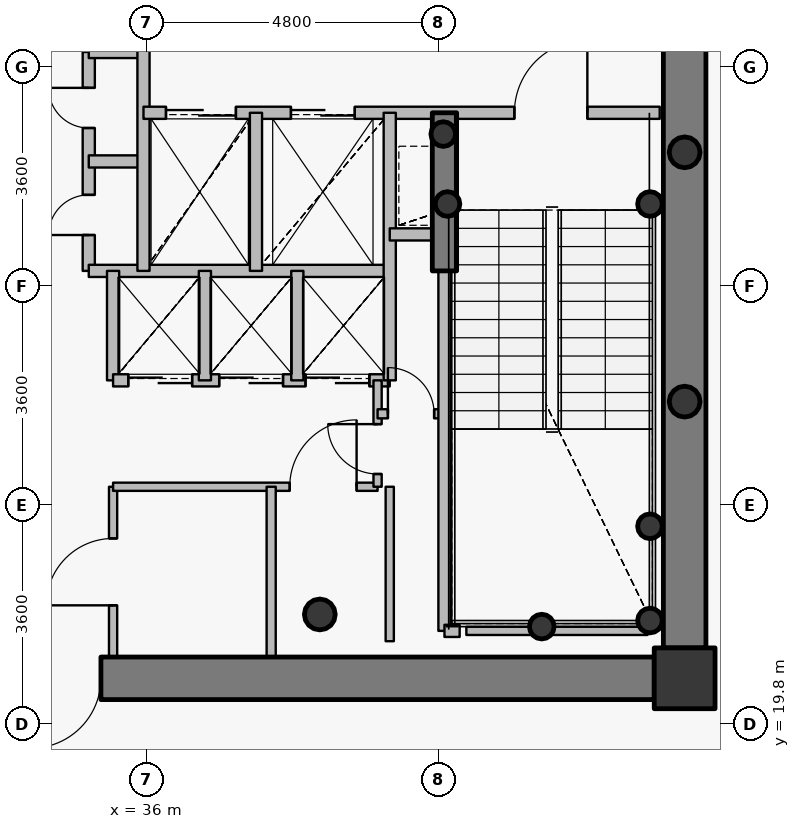
"""IFC4 building model, lengths in metres.
Left out: names, types, materials, properties, quantities, classifications, styles, units other than length and angle.
Written with IfcOpenShell. Run it as: python <this file> out.ifc"""

import sys

from ifc_helpers import new_model, si_unit, direction, frame, frame_2d, origin, origin_2d, place, context, subcontext, project, spatial, rectangle, hollow_circle, extrude, source, transform, mapped, element, fill, save


model = new_model("IFC4")
c1 = context("Model", 3, precision=1e-05, world=origin(), true_north=direction((0.0, 1.0)))
c2 = subcontext(c1, "Body", "Model", "MODEL_VIEW")
j1 = project(units=[si_unit("LENGTHUNIT", "METRE"), si_unit("PLANEANGLEUNIT", "RADIAN")], contexts=[c1])
p1 = place(None, origin())
s1 = spatial("IfcSite", under=j1, at=p1, CompositionType="ELEMENT")
p2 = place(p1, origin())
s2 = spatial("IfcBuilding", under=s1, at=p2, CompositionType="ELEMENT")
p3 = place(p2, frame((0.0, 0.0, 273.0)))
s3 = spatial("IfcBuildingStorey", under=s2, at=p3, CompositionType="ELEMENT", Elevation=273.0)
p4 = place(p3, frame((44.85, 20.55, 0.0), z_axis=(0.0, 0.0, 1.0), x_axis=(1.0, 0.0, 0.0)))
e1 = element("IfcColumn", 1, at=p4, inside=s3, PredefinedType="COLUMN", context=c2, shape_type="SweptSolid", body=[
    extrude(rectangle(XDim=1.0, YDim=1.0, at=origin_2d()), origin(), (0.0, 0.0, 1.0), 3.75),
])
p5 = place(p3, frame((38.85, 21.6, 0.0), z_axis=(0.0, 0.0, 1.0), x_axis=(1.0, 0.0, 0.0)))
e2 = element("IfcColumn", 2, at=p5, inside=s3, PredefinedType="COLUMN", context=c2, shape_type="SweptSolid", body=[
    extrude(hollow_circle(Radius=0.254, WallThickness=0.02, at=origin_2d()), origin(), (0.0, 0.0, 1.0), 3.75),
])
for number, where, z_axis, x_axis in (
    (3, (44.28, 21.5, 0.0), (0.0, 0.0, 1.0), (1.0, 0.0, 0.0)),
    (4, (44.28, 23.05, 0.0), (0.0, 0.0, 1.0), (1.0, 0.0, 0.0)),
    (5, (42.5, 21.4, 0.0), (0.0, 0.0, 1.0), (1.0, 0.0, 0.0)),
    (6, (40.95, 28.35, 0.0), (0.0, 0.0, 1.0), (1.0, 0.0, 0.0)),
    (7, (44.28, 28.35, 0.0), (0.0, 0.0, 1.0), (1.0, 0.0, 0.0)),
    (8, (40.88, 29.5, 0.0), (0.0, 0.0, 1.0), (1.0, 0.0, 0.0)),
):
    element("IfcColumn", number, at=place(p3, frame(where, z_axis=z_axis, x_axis=x_axis)), inside=s3, PredefinedType="COLUMN", context=c2, shape_type="SweptSolid", body=[
        extrude(hollow_circle(Radius=0.203, WallThickness=0.016, at=origin_2d()), origin(), (0.0, 0.0, 1.0), 3.75),
    ])
p6 = place(p3, frame((44.85, 32.95, 0.0), z_axis=(0.0, 0.0, 1.0), x_axis=(0.0, -1.0, 0.0)))
e9 = element("IfcWall", 9, at=p6, inside=s3, PredefinedType="SHEAR", context=c2, shape_type="SweptSolid", body=[
    extrude(rectangle(XDim=11.9, YDim=0.7, at=frame_2d((5.95, 0.0))), origin(), (0.0, 0.0, 1.0), 3.05),
])
p7 = place(p3, frame((44.35, 20.55, 0.0), z_axis=(0.0, 0.0, 1.0), x_axis=(-1.0, 0.0, 0.0)))
e10 = element("IfcWall", 10, at=p7, inside=s3, PredefinedType="SHEAR", context=c2, shape_type="SweptSolid", body=[
    extrude(rectangle(XDim=16.7, YDim=0.7, at=frame_2d((8.35, 0.0))), origin(), (0.0, 0.0, 1.0), 3.05),
])
p8 = place(p7, frame((12.925, 0.0, 0.0)))
e11 = element("IfcOpeningElement", 11, at=p8, cuts=e10, PredefinedType="OPENING", context=c2, shape_type="SweptSolid", body=[
    extrude(rectangle(XDim=1.15, YDim=2.15, at=origin_2d()), frame((0.575, 0.36, 1.075), z_axis=(0.0, -1.0, 0.0), x_axis=(1.0, 0.0, 0.0)), (0.0, 0.0, 1.0), 0.72),
])
p9 = place(p7, frame((9.1, 0.0, 0.0)))
e12 = element("IfcOpeningElement", 12, at=p9, cuts=e10, PredefinedType="OPENING", context=c2, shape_type="SweptSolid", body=[
    extrude(rectangle(XDim=1.15, YDim=2.15, at=origin_2d()), frame((0.575, 0.36, 1.075), z_axis=(0.0, -1.0, 0.0), x_axis=(1.0, 0.0, 0.0)), (0.0, 0.0, 1.0), 0.72),
])
p10 = place(p3, frame((40.9, 27.25, 0.0), z_axis=(0.0, 0.0, 1.0), x_axis=(0.0, 1.0, 0.0)))
e13 = element("IfcWall", 13, at=p10, inside=s3, PredefinedType="SHEAR", context=c2, shape_type="SweptSolid", body=[
    extrude(rectangle(XDim=2.6, YDim=0.4, at=frame_2d((1.3, 0.0))), origin(), (0.0, 0.0, 1.0), 3.1),
])
for number, where, z_axis, x_axis in (
    (14, (44.85, 25.1, 0.0), (0.0, 0.0, 1.0), (1.0, 0.0, 0.0)),
    (15, (44.85, 29.2, 0.0), (0.0, 0.0, 1.0), (1.0, 0.0, 0.0)),
):
    element("IfcColumn", number, at=place(p3, frame(where, z_axis=z_axis, x_axis=x_axis)), inside=s3, PredefinedType="COLUMN", context=c2, shape_type="SweptSolid", body=[
        extrude(hollow_circle(Radius=0.254, WallThickness=0.02, at=origin_2d()), origin(), (0.0, 0.0, 1.0), 3.75),
    ])
p11 = place(p3, frame((35.05, 27.25, 0.0), z_axis=(0.0, 0.0, 1.0), x_axis=(0.0, 1.0, 0.0)))
e16 = element("IfcWall", 16, at=p11, inside=s3, PredefinedType="PARTITIONING", context=c2, shape_type="SweptSolid", body=[
    extrude(rectangle(XDim=3.6, YDim=0.2, at=frame_2d((1.8, 0.0))), origin(), (0.0, 0.0, 1.0), 3.5),
])
p12 = place(p11, frame((0.59, 0.0, 0.0)))
e17 = element("IfcOpeningElement", 17, at=p12, cuts=e16, PredefinedType="OPENING", context=c2, shape_type="SweptSolid", body=[
    extrude(rectangle(XDim=0.66, YDim=2.05, at=origin_2d()), frame((0.33, 0.11, 1.025), z_axis=(0.0, -1.0, 0.0), x_axis=(1.0, 0.0, 0.0)), (0.0, 0.0, 1.0), 0.22),
])
p13 = place(p11, frame((2.35, 0.0, 0.0)))
e18 = element("IfcOpeningElement", 18, at=p13, cuts=e16, PredefinedType="OPENING", context=c2, shape_type="SweptSolid", body=[
    extrude(rectangle(XDim=0.66, YDim=2.05, at=origin_2d()), frame((0.33, 0.11, 1.025), z_axis=(0.0, -1.0, 0.0), x_axis=(1.0, 0.0, 0.0)), (0.0, 0.0, 1.0), 0.22),
])
p14 = place(p3, frame((35.05, 27.25, 0.0), z_axis=(0.0, 0.0, 1.0), x_axis=(1.0, 0.0, 0.0)))
e19 = element("IfcWall", 19, at=p14, inside=s3, PredefinedType="PARTITIONING", context=c2, shape_type="SweptSolid", body=[
    extrude(rectangle(XDim=4.95, YDim=0.2, at=frame_2d((2.475, 0.0))), origin(), (0.0, 0.0, 1.0), 3.085),
])
for number, where, z_axis, x_axis in (
    (20, (35.05, 29.05, 0.0), (0.0, 0.0, 1.0), (1.0, 0.0, 0.0)),
    (21, (35.05, 30.85, 0.0), (0.0, 0.0, 1.0), (1.0, 0.0, 0.0)),
):
    element("IfcWall", number, at=place(p3, frame(where, z_axis=z_axis, x_axis=x_axis)), inside=s3, PredefinedType="PARTITIONING", context=c2, shape_type="SweptSolid", body=[
        extrude(rectangle(XDim=0.9, YDim=0.2, at=frame_2d((0.45, 0.0))), origin(), (0.0, 0.0, 1.0), 3.5),
    ])
p15 = place(p3, frame((35.45, 20.9, 0.0), z_axis=(0.0, 0.0, 1.0), x_axis=(0.0, 1.0, 0.0)))
e22 = element("IfcWall", 22, at=p15, inside=s3, PredefinedType="PARTITIONING", context=c2, shape_type="SweptSolid", body=[
    extrude(rectangle(XDim=2.8, YDim=0.135, at=frame_2d((1.4, 0.0))), origin(), (0.0, 0.0, 1.0), 3.085),
])
p16 = place(p15, frame((0.85, 0.0, 0.0)))
e23 = element("IfcOpeningElement", 23, at=p16, cuts=e22, PredefinedType="OPENING", context=c2, shape_type="SweptSolid", body=[
    extrude(rectangle(XDim=1.1, YDim=2.15, at=origin_2d()), frame((0.55, 0.078, 1.075), z_axis=(0.0, -1.0, 0.0), x_axis=(1.0, 0.0, 0.0)), (0.0, 0.0, 1.0), 0.155),
])
p17 = place(p3, frame((35.45, 23.7, 0.0), z_axis=(0.0, 0.0, 1.0), x_axis=(1.0, 0.0, 0.0)))
e24 = element("IfcWall", 24, at=p17, inside=s3, PredefinedType="PARTITIONING", context=c2, shape_type="SweptSolid", body=[
    extrude(rectangle(XDim=4.35, YDim=0.135, at=frame_2d((2.175, 0.0))), origin(), (0.0, 0.0, 1.0), 3.085),
])
p18 = place(p17, frame((2.905, 0.0, 0.0)))
e25 = element("IfcOpeningElement", 25, at=p18, cuts=e24, PredefinedType="OPENING", context=c2, shape_type="SweptSolid", body=[
    extrude(rectangle(XDim=1.1, YDim=2.15, at=origin_2d()), frame((0.55, 0.078, 1.075), z_axis=(0.0, -1.0, 0.0), x_axis=(1.0, 0.0, 0.0)), (0.0, 0.0, 1.0), 0.155),
])
p19 = place(p3, frame((35.45, 25.45, 0.0), z_axis=(0.0, 0.0, 1.0), x_axis=(0.0, 1.0, 0.0)))
e26 = element("IfcWall", 26, at=p19, inside=s3, PredefinedType="PARTITIONING", context=c2, shape_type="SweptSolid", body=[
    extrude(rectangle(XDim=1.8, YDim=0.2, at=frame_2d((0.9, 0.0))), origin(), (0.0, 0.0, 1.0), 3.5),
])
p20 = place(p3, frame((35.45, 25.45, 0.0), z_axis=(0.0, 0.0, 1.0), x_axis=(1.0, 0.0, 0.0)))
e27 = element("IfcWall", 27, at=p20, inside=s3, PredefinedType="PARTITIONING", context=c2, shape_type="SweptSolid", body=[
    extrude(rectangle(XDim=4.55, YDim=0.2, at=frame_2d((2.275, 0.0))), origin(), (0.0, 0.0, 1.0), 3.085),
])
p21 = place(p20, frame((0.25, 0.0, 0.0)))
e28 = element("IfcOpeningElement", 28, at=p21, cuts=e27, PredefinedType="OPENING", context=c2, shape_type="SweptSolid", body=[
    extrude(rectangle(XDim=1.05, YDim=2.15, at=origin_2d()), frame((0.525, 0.11, 1.075), z_axis=(0.0, -1.0, 0.0), x_axis=(1.0, 0.0, 0.0)), (0.0, 0.0, 1.0), 0.22),
])
p22 = place(p20, frame((1.745, 0.0, 0.0)))
e29 = element("IfcOpeningElement", 29, at=p22, cuts=e27, PredefinedType="OPENING", context=c2, shape_type="SweptSolid", body=[
    extrude(rectangle(XDim=1.05, YDim=2.15, at=origin_2d()), frame((0.525, 0.11, 1.075), z_axis=(0.0, -1.0, 0.0), x_axis=(1.0, 0.0, 0.0)), (0.0, 0.0, 1.0), 0.22),
])
p23 = place(p20, frame((3.165, 0.0, 0.0)))
e30 = element("IfcOpeningElement", 30, at=p23, cuts=e27, PredefinedType="OPENING", context=c2, shape_type="SweptSolid", body=[
    extrude(rectangle(XDim=1.05, YDim=2.15, at=origin_2d()), frame((0.525, 0.11, 1.075), z_axis=(0.0, -1.0, 0.0), x_axis=(1.0, 0.0, 0.0)), (0.0, 0.0, 1.0), 0.22),
])
p24 = place(p3, frame((35.95, 27.25, 0.0), z_axis=(0.0, 0.0, 1.0), x_axis=(0.0, 1.0, 0.0)))
e31 = element("IfcWall", 31, at=p24, inside=s3, PredefinedType="PARTITIONING", context=c2, shape_type="SweptSolid", body=[
    extrude(rectangle(XDim=3.8, YDim=0.2, at=frame_2d((1.9, 0.0))), origin(), (0.0, 0.0, 1.0), 3.5),
])
p25 = place(p3, frame((35.95, 29.85, 0.0), z_axis=(0.0, 0.0, 1.0), x_axis=(1.0, 0.0, 0.0)))
e32 = element("IfcWall", 32, at=p25, inside=s3, PredefinedType="PARTITIONING", context=c2, shape_type="SweptSolid", body=[
    extrude(rectangle(XDim=8.49, YDim=0.2, at=frame_2d((4.245, 0.0))), origin(), (0.0, 0.0, 1.0), 3.085),
])
p26 = place(p25, frame((6.1, 0.0, 0.0)))
e33 = element("IfcOpeningElement", 33, at=p26, cuts=e32, PredefinedType="OPENING", context=c2, shape_type="SweptSolid", body=[
    extrude(rectangle(XDim=1.2, YDim=2.15, at=origin_2d()), frame((0.6, 0.11, 1.075), z_axis=(0.0, -1.0, 0.0), x_axis=(1.0, 0.0, 0.0)), (0.0, 0.0, 1.0), 0.22),
])
p27 = place(p25, frame((0.37, 0.0, 0.0)))
e34 = element("IfcOpeningElement", 34, at=p27, cuts=e32, PredefinedType="OPENING", context=c2, shape_type="SweptSolid", body=[
    extrude(rectangle(XDim=1.15, YDim=2.15, at=origin_2d()), frame((0.575, 0.11, 1.075), z_axis=(0.0, -1.0, 0.0), x_axis=(1.0, 0.0, 0.0)), (0.0, 0.0, 1.0), 0.22),
])
p28 = place(p25, frame((2.425, 0.0, 0.0)))
e35 = element("IfcOpeningElement", 35, at=p28, cuts=e32, PredefinedType="OPENING", context=c2, shape_type="SweptSolid", body=[
    extrude(rectangle(XDim=1.05, YDim=2.15, at=origin_2d()), frame((0.525, 0.11, 1.075), z_axis=(0.0, -1.0, 0.0), x_axis=(1.0, 0.0, 0.0)), (0.0, 0.0, 1.0), 0.22),
])
p29 = place(p3, frame((36.96, 25.45, 0.0), z_axis=(0.0, 0.0, 1.0), x_axis=(0.0, 1.0, 0.0)))
e36 = element("IfcWall", 36, at=p29, inside=s3, PredefinedType="PARTITIONING", context=c2, shape_type="SweptSolid", body=[
    extrude(rectangle(XDim=1.8, YDim=0.2, at=frame_2d((0.9, 0.0))), origin(), (0.0, 0.0, 1.0), 3.5),
])
p30 = place(p3, frame((37.8, 27.25, 0.0), z_axis=(0.0, 0.0, 1.0), x_axis=(0.0, 1.0, 0.0)))
e37 = element("IfcWall", 37, at=p30, inside=s3, PredefinedType="PARTITIONING", context=c2, shape_type="SweptSolid", body=[
    extrude(rectangle(XDim=2.6, YDim=0.2, at=frame_2d((1.3, 0.0))), origin(), (0.0, 0.0, 1.0), 3.5),
])
p31 = place(p3, frame((38.05, 20.38, 0.0), z_axis=(0.0, 0.0, 1.0), x_axis=(0.0, 1.0, 0.0)))
e38 = element("IfcWall", 38, at=p31, inside=s3, PredefinedType="PARTITIONING", context=c2, shape_type="SweptSolid", body=[
    extrude(rectangle(XDim=3.32, YDim=0.15, at=frame_2d((1.66, 0.0))), origin(), (0.0, 0.0, 1.0), 3.035),
])
p32 = place(p3, frame((38.48, 25.45, 0.0), z_axis=(0.0, 0.0, 1.0), x_axis=(0.0, 1.0, 0.0)))
e39 = element("IfcWall", 39, at=p32, inside=s3, PredefinedType="PARTITIONING", context=c2, shape_type="SweptSolid", body=[
    extrude(rectangle(XDim=1.8, YDim=0.2, at=frame_2d((0.9, 0.0))), origin(), (0.0, 0.0, 1.0), 3.5),
])
p33 = place(p3, frame((39.8, 23.7, 0.0), z_axis=(0.0, 0.0, 1.0), x_axis=(0.0, 1.0, 0.0)))
e40 = element("IfcWall", 40, at=p33, inside=s3, PredefinedType="PARTITIONING", context=c2, shape_type="SweptSolid", body=[
    extrude(rectangle(XDim=1.75, YDim=0.135, at=frame_2d((0.875, 0.0))), origin(), (0.0, 0.0, 1.0), 3.5),
])
p34 = place(p33, frame((0.21, 0.0, 0.0)))
e41 = element("IfcOpeningElement", 41, at=p34, cuts=e40, PredefinedType="OPENING", context=c2, shape_type="SweptSolid", body=[
    extrude(rectangle(XDim=0.82, YDim=2.1, at=origin_2d()), frame((0.41, 0.078, 1.05), z_axis=(0.0, -1.0, 0.0), x_axis=(1.0, 0.0, 0.0)), (0.0, 0.0, 1.0), 0.155),
])
p35 = place(p3, frame((39.8, 24.9, 0.0), z_axis=(0.0, 0.0, 1.0), x_axis=(1.0, 0.0, 0.0)))
e42 = element("IfcWall", 42, at=p35, inside=s3, PredefinedType="PARTITIONING", context=c2, shape_type="SweptSolid", body=[
    extrude(rectangle(XDim=1.1, YDim=0.15, at=frame_2d((0.55, 0.0))), origin(), (0.0, 0.0, 1.0), 3.5),
])
p36 = place(p35, frame((0.17, 0.0, 0.0)))
e43 = element("IfcOpeningElement", 43, at=p36, cuts=e42, PredefinedType="OPENING", context=c2, shape_type="SweptSolid", body=[
    extrude(rectangle(XDim=0.76, YDim=2.1, at=origin_2d()), frame((0.38, 0.085, 1.05), z_axis=(0.0, -1.0, 0.0), x_axis=(1.0, 0.0, 0.0)), (0.0, 0.0, 1.0), 0.17),
])
p37 = place(p3, frame((40.0, 25.45, 0.0), z_axis=(0.0, 0.0, 1.0), x_axis=(0.0, 1.0, 0.0)))
e44 = element("IfcWall", 44, at=p37, inside=s3, PredefinedType="PARTITIONING", context=c2, shape_type="SweptSolid", body=[
    extrude(rectangle(XDim=4.4, YDim=0.2, at=frame_2d((2.2, 0.0))), origin(), (0.0, 0.0, 1.0), 3.5),
])
p38 = place(p3, frame((40.0, 27.85, 0.0), z_axis=(0.0, 0.0, 1.0), x_axis=(1.0, 0.0, 0.0)))
e45 = element("IfcWall", 45, at=p38, inside=s3, PredefinedType="PARTITIONING", context=c2, shape_type="SweptSolid", body=[
    extrude(rectangle(XDim=0.9, YDim=0.2, at=frame_2d((0.45, 0.0))), origin(), (0.0, 0.0, 1.0), 3.5),
])
p39 = place(p3, frame((40.9, 21.33, 0.0), z_axis=(0.0, 0.0, 1.0), x_axis=(0.0, 1.0, 0.0)))
e46 = element("IfcWall", 46, at=p39, inside=s3, PredefinedType="PARTITIONING", context=c2, shape_type="SweptSolid", body=[
    extrude(rectangle(XDim=5.91, YDim=0.2, at=frame_2d((2.955, 0.0))), origin(), (0.0, 0.0, 1.0), 3.035),
])
p40 = place(p3, frame((40.9, 21.33, 0.0), z_axis=(0.0, 0.0, 1.0), x_axis=(1.0, 0.0, 0.0)))
e47 = element("IfcWall", 47, at=p40, inside=s3, PredefinedType="PARTITIONING", context=c2, shape_type="SweptSolid", body=[
    extrude(rectangle(XDim=0.25, YDim=0.2, at=frame_2d((0.125, 0.0))), origin(), (0.0, 0.0, 1.0), 3.035),
])
p41 = place(p3, frame((44.24, 21.33, 0.0), z_axis=(0.0, 0.0, 1.0), x_axis=(-1.0, 0.0, 0.0)))
e48 = element("IfcWall", 48, at=p41, inside=s3, PredefinedType="PARTITIONING", context=c2, shape_type="SweptSolid", body=[
    extrude(rectangle(XDim=2.98, YDim=0.135, at=frame_2d((1.49, 0.0))), origin(), (0.0, 0.0, 1.0), 3.035),
])
p42 = place(p3, frame((40.0, 23.7, 0.0), z_axis=(0.0, 0.0, 1.0), x_axis=(0.0, -1.0, 0.0)))
e49 = element("IfcWall", 49, at=p42, inside=s3, PredefinedType="PARTITIONING", context=c2, shape_type="SweptSolid", body=[
    extrude(rectangle(XDim=2.54, YDim=0.135, at=frame_2d((1.27, 0.0))), origin(), (0.0, 0.0, 1.0), 3.035),
])
p43 = place(p3, frame((44.36, 20.2, 0.0), z_axis=(0.0, 0.0, 1.0), x_axis=(1.0, 0.0, 0.0)))
e50 = element("IfcWall", 50, at=p43, inside=s3, PredefinedType="PARTITIONING", context=c2, shape_type="SweptSolid", body=[
    extrude(rectangle(XDim=0.84, YDim=0.135, at=frame_2d((0.42, 0.0))), origin(), (0.0, 0.0, 1.0), 3.035),
])
p44 = place(p3, frame((45.2, 20.508, 0.0), z_axis=(0.0, 0.0, 1.0), x_axis=(0.0, 1.0, 0.0)))
e51 = element("IfcWall", 51, at=p44, inside=s3, PredefinedType="PARTITIONING", context=c2, shape_type="SweptSolid", body=[
    extrude(rectangle(XDim=0.532, YDim=0.135, at=frame_2d((0.266, 0.0))), origin(), (0.0, 0.0, 1.0), 3.5),
])
m1 = source(origin(), c2, "Body", "SweptSolid", [
    extrude(rectangle(XDim=1.15, YDim=2.15, at=origin_2d()), frame((0.575, 0.025, 1.075), z_axis=(0.0, -1.0, 0.0), x_axis=(1.0, 0.0, 0.0)), (0.0, 0.0, 1.0), 0.05),
])
p45 = place(p9, origin())
e52 = element("IfcDoor", 52, at=p45, inside=s3, OperationType="SINGLE_SWING_RIGHT", PredefinedType="DOOR", context=c2, shape_type="MappedRepresentation", body=[
    mapped(m1, transform((0.0, 0.0, 0.0), x_axis=(1.0, 0.0, 0.0), y_axis=(0.0, 1.0, 0.0), z_axis=(0.0, 0.0, 1.0), scale=1.0)),
])
fill(e12, e52)
m2 = source(origin(), c2, "Body", "SweptSolid", [
    extrude(rectangle(XDim=1.2, YDim=2.15, at=origin_2d()), frame((0.6, 0.025, 1.075), z_axis=(0.0, -1.0, 0.0), x_axis=(1.0, 0.0, 0.0)), (0.0, 0.0, 1.0), 0.05),
])
p46 = place(p26, origin())
e53 = element("IfcDoor", 53, at=p46, inside=s3, OperationType="SINGLE_SWING_RIGHT", PredefinedType="DOOR", context=c2, shape_type="MappedRepresentation", body=[
    mapped(m2, transform((0.0, 0.0, 0.0), x_axis=(1.0, 0.0, 0.0), y_axis=(0.0, 1.0, 0.0), z_axis=(0.0, 0.0, 1.0), scale=1.0)),
])
fill(e33, e53)
m3 = source(origin(), c2, "Body", "SweptSolid", [
    extrude(rectangle(XDim=1.15, YDim=2.15, at=origin_2d()), frame((0.575, 0.025, 1.075), z_axis=(0.0, -1.0, 0.0), x_axis=(1.0, 0.0, 0.0)), (0.0, 0.0, 1.0), 0.05),
])
p47 = place(p27, origin())
e54 = element("IfcDoor", 54, at=p47, inside=s3, OperationType="DOUBLE_DOOR_SLIDING", PredefinedType="USERDEFINED", context=c2, shape_type="MappedRepresentation", body=[
    mapped(m3, transform((0.0, 0.0, 0.0), x_axis=(1.0, 0.0, 0.0), y_axis=(0.0, 1.0, 0.0), z_axis=(0.0, 0.0, 1.0), scale=1.0)),
])
fill(e34, e54)
m4 = source(origin(), c2, "Body", "SweptSolid", [
    extrude(rectangle(XDim=1.05, YDim=2.15, at=origin_2d()), frame((0.525, 0.025, 1.075), z_axis=(0.0, -1.0, 0.0), x_axis=(1.0, 0.0, 0.0)), (0.0, 0.0, 1.0), 0.05),
])
p48 = place(p28, origin())
e55 = element("IfcDoor", 55, at=p48, inside=s3, OperationType="DOUBLE_DOOR_SLIDING", PredefinedType="USERDEFINED", context=c2, shape_type="MappedRepresentation", body=[
    mapped(m4, transform((0.0, 0.0, 0.0), x_axis=(1.0, 0.0, 0.0), y_axis=(0.0, 1.0, 0.0), z_axis=(0.0, 0.0, 1.0), scale=1.0)),
])
fill(e35, e55)
p49 = place(p21, origin())
e56 = element("IfcDoor", 56, at=p49, inside=s3, OperationType="DOUBLE_DOOR_SLIDING", PredefinedType="USERDEFINED", context=c2, shape_type="MappedRepresentation", body=[
    mapped(m4, transform((0.0, 0.0, 0.0), x_axis=(1.0, 0.0, 0.0), y_axis=(0.0, 1.0, 0.0), z_axis=(0.0, 0.0, 1.0), scale=1.0)),
])
fill(e28, e56)
p50 = place(p22, origin())
e57 = element("IfcDoor", 57, at=p50, inside=s3, OperationType="DOUBLE_DOOR_SLIDING", PredefinedType="USERDEFINED", context=c2, shape_type="MappedRepresentation", body=[
    mapped(m4, transform((0.0, 0.0, 0.0), x_axis=(1.0, 0.0, 0.0), y_axis=(0.0, 1.0, 0.0), z_axis=(0.0, 0.0, 1.0), scale=1.0)),
])
fill(e29, e57)
p51 = place(p23, origin())
e58 = element("IfcDoor", 58, at=p51, inside=s3, OperationType="DOUBLE_DOOR_SLIDING", PredefinedType="USERDEFINED", context=c2, shape_type="MappedRepresentation", body=[
    mapped(m4, transform((0.0, 0.0, 0.0), x_axis=(1.0, 0.0, 0.0), y_axis=(0.0, 1.0, 0.0), z_axis=(0.0, 0.0, 1.0), scale=1.0)),
])
fill(e30, e58)
m5 = source(origin(), c2, "Body", "SweptSolid", [
    extrude(rectangle(XDim=0.66, YDim=2.05, at=origin_2d()), frame((0.33, 0.025, 1.025), z_axis=(0.0, -1.0, 0.0), x_axis=(1.0, 0.0, 0.0)), (0.0, 0.0, 1.0), 0.05),
])
p52 = place(p12, origin())
e59 = element("IfcDoor", 59, at=p52, inside=s3, OperationType="SINGLE_SWING_LEFT", PredefinedType="USERDEFINED", context=c2, shape_type="MappedRepresentation", body=[
    mapped(m5, transform((0.0, 0.0, 0.0), x_axis=(1.0, 0.0, 0.0), y_axis=(0.0, 1.0, 0.0), z_axis=(0.0, 0.0, 1.0), scale=1.0)),
])
fill(e17, e59)
p53 = place(p13, origin())
e60 = element("IfcDoor", 60, at=p53, inside=s3, OperationType="SINGLE_SWING_RIGHT", PredefinedType="USERDEFINED", context=c2, shape_type="MappedRepresentation", body=[
    mapped(m5, transform((0.0, 0.0, 0.0), x_axis=(1.0, 0.0, 0.0), y_axis=(0.0, 1.0, 0.0), z_axis=(0.0, 0.0, 1.0), scale=1.0)),
])
fill(e18, e60)
m6 = source(origin(), c2, "Body", "SweptSolid", [
    extrude(rectangle(XDim=1.1, YDim=2.15, at=origin_2d()), frame((0.55, 0.025, 1.075), z_axis=(0.0, -1.0, 0.0), x_axis=(1.0, 0.0, 0.0)), (0.0, 0.0, 1.0), 0.05),
])
p54 = place(p16, origin())
e61 = element("IfcDoor", 61, at=p54, inside=s3, OperationType="SINGLE_SWING_LEFT", PredefinedType="DOOR", context=c2, shape_type="MappedRepresentation", body=[
    mapped(m6, transform((0.0, 0.0, 0.0), x_axis=(1.0, 0.0, 0.0), y_axis=(0.0, 1.0, 0.0), z_axis=(0.0, 0.0, 1.0), scale=1.0)),
])
fill(e23, e61)
p55 = place(p18, origin())
e62 = element("IfcDoor", 62, at=p55, inside=s3, OperationType="SINGLE_SWING_RIGHT", PredefinedType="DOOR", context=c2, shape_type="MappedRepresentation", body=[
    mapped(m6, transform((0.0, 0.0, 0.0), x_axis=(1.0, 0.0, 0.0), y_axis=(0.0, 1.0, 0.0), z_axis=(0.0, 0.0, 1.0), scale=1.0)),
])
fill(e25, e62)
m7 = source(origin(), c2, "Body", "SweptSolid", [
    extrude(rectangle(XDim=0.82, YDim=2.1, at=origin_2d()), frame((0.41, 0.025, 1.05), z_axis=(0.0, -1.0, 0.0), x_axis=(1.0, 0.0, 0.0)), (0.0, 0.0, 1.0), 0.05),
])
p56 = place(p34, origin())
e63 = element("IfcDoor", 63, at=p56, inside=s3, OperationType="SINGLE_SWING_RIGHT", PredefinedType="DOOR", context=c2, shape_type="MappedRepresentation", body=[
    mapped(m7, transform((0.0, 0.0, 0.0), x_axis=(1.0, 0.0, 0.0), y_axis=(0.0, 1.0, 0.0), z_axis=(0.0, 0.0, 1.0), scale=1.0)),
])
fill(e41, e63)
m8 = source(origin(), c2, "Body", "SweptSolid", [
    extrude(rectangle(XDim=0.76, YDim=2.1, at=origin_2d()), frame((0.38, 0.025, 1.05), z_axis=(0.0, -1.0, 0.0), x_axis=(1.0, 0.0, 0.0)), (0.0, 0.0, 1.0), 0.05),
])
p57 = place(p36, origin())
e64 = element("IfcDoor", 64, at=p57, inside=s3, OperationType="SINGLE_SWING_LEFT", PredefinedType="DOOR", context=c2, shape_type="MappedRepresentation", body=[
    mapped(m8, transform((0.0, 0.0, 0.0), x_axis=(1.0, 0.0, 0.0), y_axis=(0.0, 1.0, 0.0), z_axis=(0.0, 0.0, 1.0), scale=1.0)),
])
fill(e43, e64)
save(model, sys.argv[1])
